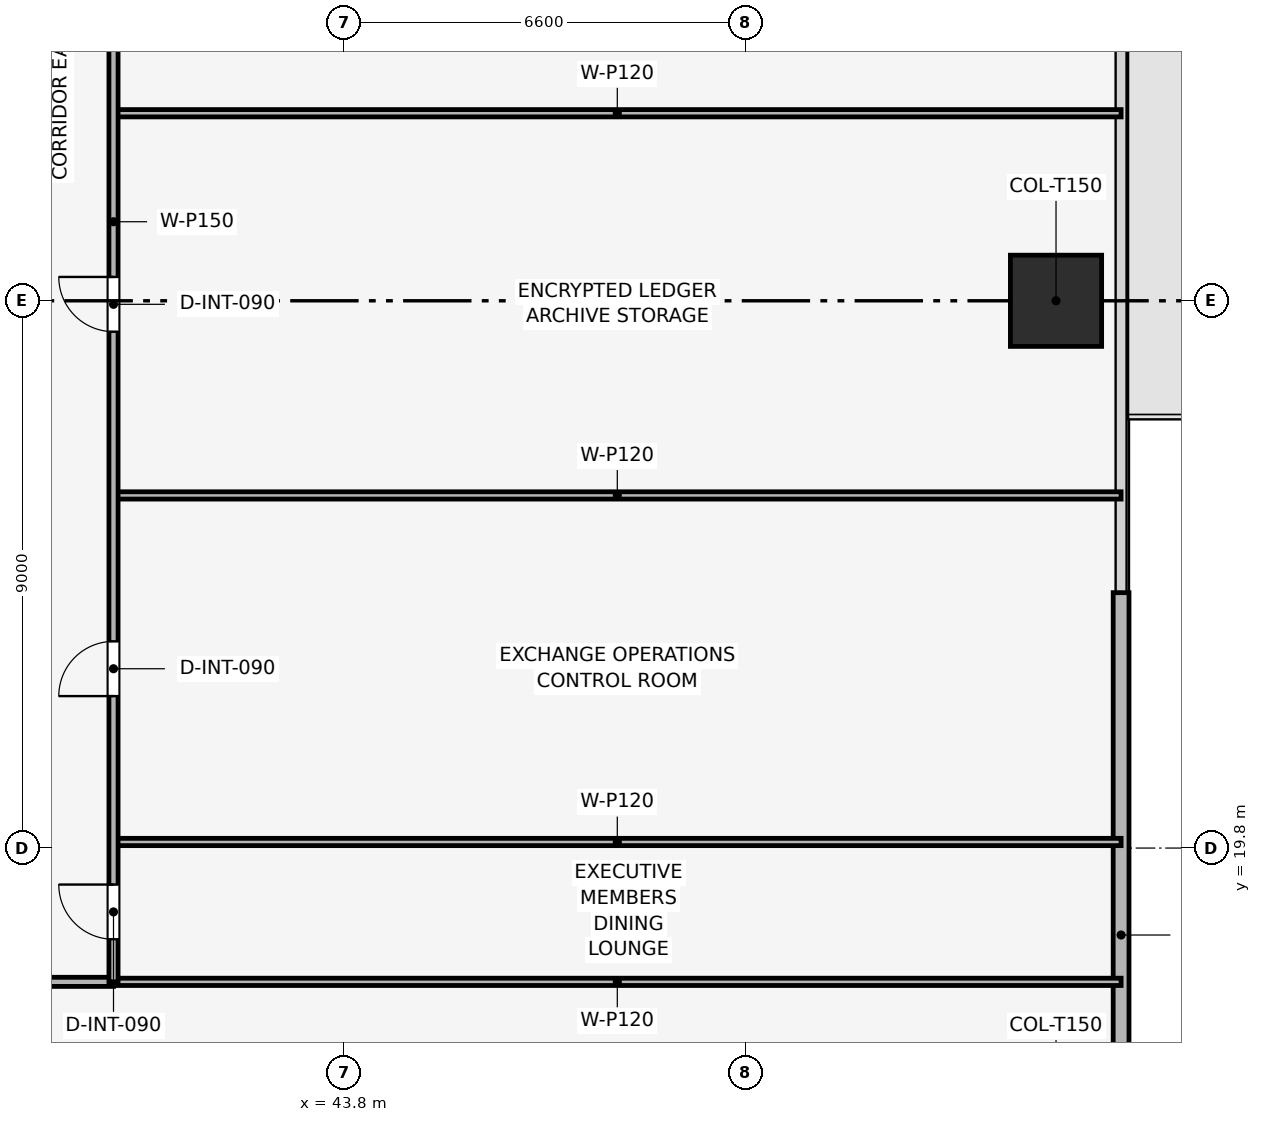
"""IFC4 building model, lengths in metres.
Left out: names, types, materials, properties, quantities, classifications, styles, units other than length and angle.
Written with IfcOpenShell. Run it as: python <this file> out.ifc"""

import sys

from ifc_helpers import new_model, si_unit, direction, frame, frame_2d, origin, origin_2d, place, context, subcontext, project, spatial, rectangle, extrude, element, fill, save


model = new_model("IFC4")
c1 = context("Model", 3, precision=1e-05, world=origin(), true_north=direction((0.0, 1.0)))
c2 = subcontext(c1, "Body", "Model", "MODEL_VIEW")
j1 = project(units=[si_unit("LENGTHUNIT", "METRE"), si_unit("PLANEANGLEUNIT", "RADIAN")], contexts=[c1])
p1 = place(None, origin())
s1 = spatial("IfcSite", under=j1, at=p1, CompositionType="ELEMENT")
p2 = place(p1, origin())
s2 = spatial("IfcBuilding", under=s1, at=p2, CompositionType="ELEMENT")
p3 = place(p2, frame((0.0, 0.0, 37.8)))
s3 = spatial("IfcBuildingStorey", under=s2, at=p3, CompositionType="ELEMENT", Elevation=37.8)
p4 = place(p3, frame((55.5, 28.8, 0.003), z_axis=(0.0, 0.0, 1.0), x_axis=(1.0, 0.0, 0.0)))
e1 = element("IfcColumn", 1, at=p4, inside=s3, PredefinedType="COLUMN", context=c2, shape_type="SweptSolid", body=[
    extrude(rectangle(XDim=1.5, YDim=1.5, at=origin_2d()), origin(), (0.0, 0.0, 1.0), 3.644),
])
p5 = place(p3, frame((56.57, 24.0, 0.0), z_axis=(0.0, 0.0, 1.0), x_axis=(0.0, -1.0, 0.0)))
e2 = element("IfcWall", 2, at=p5, inside=s3, PredefinedType="SOLIDWALL", context=c2, shape_type="SweptSolid", body=[
    extrude(rectangle(XDim=15.3, YDim=0.26, at=frame_2d((7.65, 0.0))), origin(), (0.0, 0.0, 1.0), 3.65),
])
p6 = place(p5, frame((11.25, 0.0, 0.9)))
e3 = element("IfcOpeningElement", 3, at=p6, cuts=e2, PredefinedType="OPENING", context=c2, shape_type="SweptSolid", body=[
    extrude(rectangle(XDim=3.8, YDim=1.9, at=frame_2d((1.9, 0.95))), frame((0.0, 0.14, 0.0), z_axis=(0.0, -1.0, 0.0), x_axis=(1.0, 0.0, 0.0)), (0.0, 0.0, 1.0), 0.28),
])
for number, where, z_axis, x_axis in (
    (4, (40.0, 17.6, 0.0), (0.0, 0.0, 1.0), (1.0, 0.0, 0.0)),
    (5, (40.0, 19.9, 0.0), (0.0, 0.0, 1.0), (1.0, 0.0, 0.0)),
    (6, (40.0, 25.599, 0.0), (0.0, 0.0, 1.0), (1.0, 0.0, 0.0)),
    (7, (40.0, 31.884, 0.0), (0.0, 0.0, 1.0), (1.0, 0.0, 0.0)),
):
    element("IfcWall", number, at=place(p3, frame(where, z_axis=z_axis, x_axis=x_axis)), inside=s3, PredefinedType="PARTITIONING", context=c2, shape_type="SweptSolid", body=[
        extrude(rectangle(XDim=16.57, YDim=0.12, at=frame_2d((8.285, 0.0))), origin(), (0.0, 0.0, 1.0), 2.935),
    ])
p7 = place(p3, frame((17.6, 17.6, 0.0), z_axis=(0.0, 0.0, 1.0), x_axis=(1.0, 0.0, 0.0)))
e8 = element("IfcWall", 8, at=p7, inside=s3, PredefinedType="PARTITIONING", context=c2, shape_type="SweptSolid", body=[
    extrude(rectangle(XDim=22.4, YDim=0.15, at=frame_2d((11.2, 0.0))), origin(), (0.0, 0.0, 1.0), 3.085),
])
p8 = place(p7, frame((1.85, 0.0, 0.0)))
e9 = element("IfcOpeningElement", 9, at=p8, cuts=e8, PredefinedType="OPENING", context=c2, shape_type="SweptSolid", body=[
    extrude(rectangle(XDim=0.9, YDim=2.1, at=frame_2d((0.45, 1.05))), frame((0.0, 0.085, 0.0), z_axis=(0.0, -1.0, 0.0), x_axis=(1.0, 0.0, 0.0)), (0.0, 0.0, 1.0), 0.17),
])
p9 = place(p7, frame((5.55, 0.0, 0.0)))
e10 = element("IfcOpeningElement", 10, at=p9, cuts=e8, PredefinedType="OPENING", context=c2, shape_type="SweptSolid", body=[
    extrude(rectangle(XDim=0.9, YDim=2.1, at=frame_2d((0.45, 1.05))), frame((0.0, 0.085, 0.0), z_axis=(0.0, -1.0, 0.0), x_axis=(1.0, 0.0, 0.0)), (0.0, 0.0, 1.0), 0.17),
])
p10 = place(p7, frame((8.45, 0.0, 0.0)))
e11 = element("IfcOpeningElement", 11, at=p10, cuts=e8, PredefinedType="OPENING", context=c2, shape_type="SweptSolid", body=[
    extrude(rectangle(XDim=0.9, YDim=2.1, at=frame_2d((0.45, 1.05))), frame((0.0, 0.085, 0.0), z_axis=(0.0, -1.0, 0.0), x_axis=(1.0, 0.0, 0.0)), (0.0, 0.0, 1.0), 0.17),
])
p11 = place(p7, frame((11.2, 0.0, 0.0)))
e12 = element("IfcOpeningElement", 12, at=p11, cuts=e8, PredefinedType="OPENING", context=c2, shape_type="SweptSolid", body=[
    extrude(rectangle(XDim=0.95, YDim=2.1, at=frame_2d((0.475, 1.05))), frame((0.0, 0.085, 0.0), z_axis=(0.0, -1.0, 0.0), x_axis=(1.0, 0.0, 0.0)), (0.0, 0.0, 1.0), 0.17),
])
p12 = place(p7, frame((17.25, 0.0, 0.0)))
e13 = element("IfcOpeningElement", 13, at=p12, cuts=e8, PredefinedType="OPENING", context=c2, shape_type="SweptSolid", body=[
    extrude(rectangle(XDim=0.9, YDim=2.1, at=frame_2d((0.45, 1.05))), frame((0.0, 0.085, 0.0), z_axis=(0.0, -1.0, 0.0), x_axis=(1.0, 0.0, 0.0)), (0.0, 0.0, 1.0), 0.17),
])
p13 = place(p3, frame((40.0, 17.6, 0.0), z_axis=(0.0, 0.0, 1.0), x_axis=(0.0, 1.0, 0.0)))
e14 = element("IfcWall", 14, at=p13, inside=s3, PredefinedType="PARTITIONING", context=c2, shape_type="SweptSolid", body=[
    extrude(rectangle(XDim=22.4, YDim=0.15, at=frame_2d((11.2, 0.0))), origin(), (0.0, 0.0, 1.0), 3.085),
])
p14 = place(p13, frame((0.7, 0.0, 0.0)))
e15 = element("IfcOpeningElement", 15, at=p14, cuts=e14, PredefinedType="OPENING", context=c2, shape_type="SweptSolid", body=[
    extrude(rectangle(XDim=0.9, YDim=2.1, at=frame_2d((0.45, 1.05))), frame((0.0, 0.085, 0.0), z_axis=(0.0, -1.0, 0.0), x_axis=(1.0, 0.0, 0.0)), (0.0, 0.0, 1.0), 0.17),
])
p15 = place(p13, frame((4.699, 0.0, 0.0)))
e16 = element("IfcOpeningElement", 16, at=p15, cuts=e14, PredefinedType="OPENING", context=c2, shape_type="SweptSolid", body=[
    extrude(rectangle(XDim=0.9, YDim=2.1, at=frame_2d((0.45, 1.05))), frame((0.0, 0.085, 0.0), z_axis=(0.0, -1.0, 0.0), x_axis=(1.0, 0.0, 0.0)), (0.0, 0.0, 1.0), 0.17),
])
p16 = place(p13, frame((10.692, 0.0, 0.0)))
e17 = element("IfcOpeningElement", 17, at=p16, cuts=e14, PredefinedType="OPENING", context=c2, shape_type="SweptSolid", body=[
    extrude(rectangle(XDim=0.9, YDim=2.1, at=frame_2d((0.45, 1.05))), frame((0.0, 0.085, 0.0), z_axis=(0.0, -1.0, 0.0), x_axis=(1.0, 0.0, 0.0)), (0.0, 0.0, 1.0), 0.17),
])
p17 = place(p13, frame((17.892, 0.0, 0.0)))
e18 = element("IfcOpeningElement", 18, at=p17, cuts=e14, PredefinedType="OPENING", context=c2, shape_type="SweptSolid", body=[
    extrude(rectangle(XDim=0.9, YDim=2.1, at=frame_2d((0.45, 1.05))), frame((0.0, 0.085, 0.0), z_axis=(0.0, -1.0, 0.0), x_axis=(1.0, 0.0, 0.0)), (0.0, 0.0, 1.0), 0.17),
])
p18 = place(p14, origin())
e19 = element("IfcDoor", 19, at=p18, inside=s3, OperationType="SINGLE_SWING_RIGHT", PredefinedType="DOOR", context=c2, shape_type="SweptSolid", body=[
    extrude(rectangle(XDim=0.9, YDim=2.1, at=frame_2d((0.45, 1.05))), frame((0.0, 0.025, 0.0), z_axis=(0.0, -1.0, 0.0), x_axis=(1.0, 0.0, 0.0)), (0.0, 0.0, 1.0), 0.05),
])
fill(e15, e19)
p19 = place(p15, origin())
e20 = element("IfcDoor", 20, at=p19, inside=s3, OperationType="SINGLE_SWING_LEFT", PredefinedType="DOOR", context=c2, shape_type="SweptSolid", body=[
    extrude(rectangle(XDim=0.9, YDim=2.1, at=frame_2d((0.45, 1.05))), frame((0.0, 0.025, 0.0), z_axis=(0.0, -1.0, 0.0), x_axis=(1.0, 0.0, 0.0)), (0.0, 0.0, 1.0), 0.05),
])
fill(e16, e20)
p20 = place(p16, origin())
e21 = element("IfcDoor", 21, at=p20, inside=s3, OperationType="SINGLE_SWING_RIGHT", PredefinedType="DOOR", context=c2, shape_type="SweptSolid", body=[
    extrude(rectangle(XDim=0.9, YDim=2.1, at=frame_2d((0.45, 1.05))), frame((0.0, 0.025, 0.0), z_axis=(0.0, -1.0, 0.0), x_axis=(1.0, 0.0, 0.0)), (0.0, 0.0, 1.0), 0.05),
])
fill(e17, e21)
save(model, sys.argv[1])
